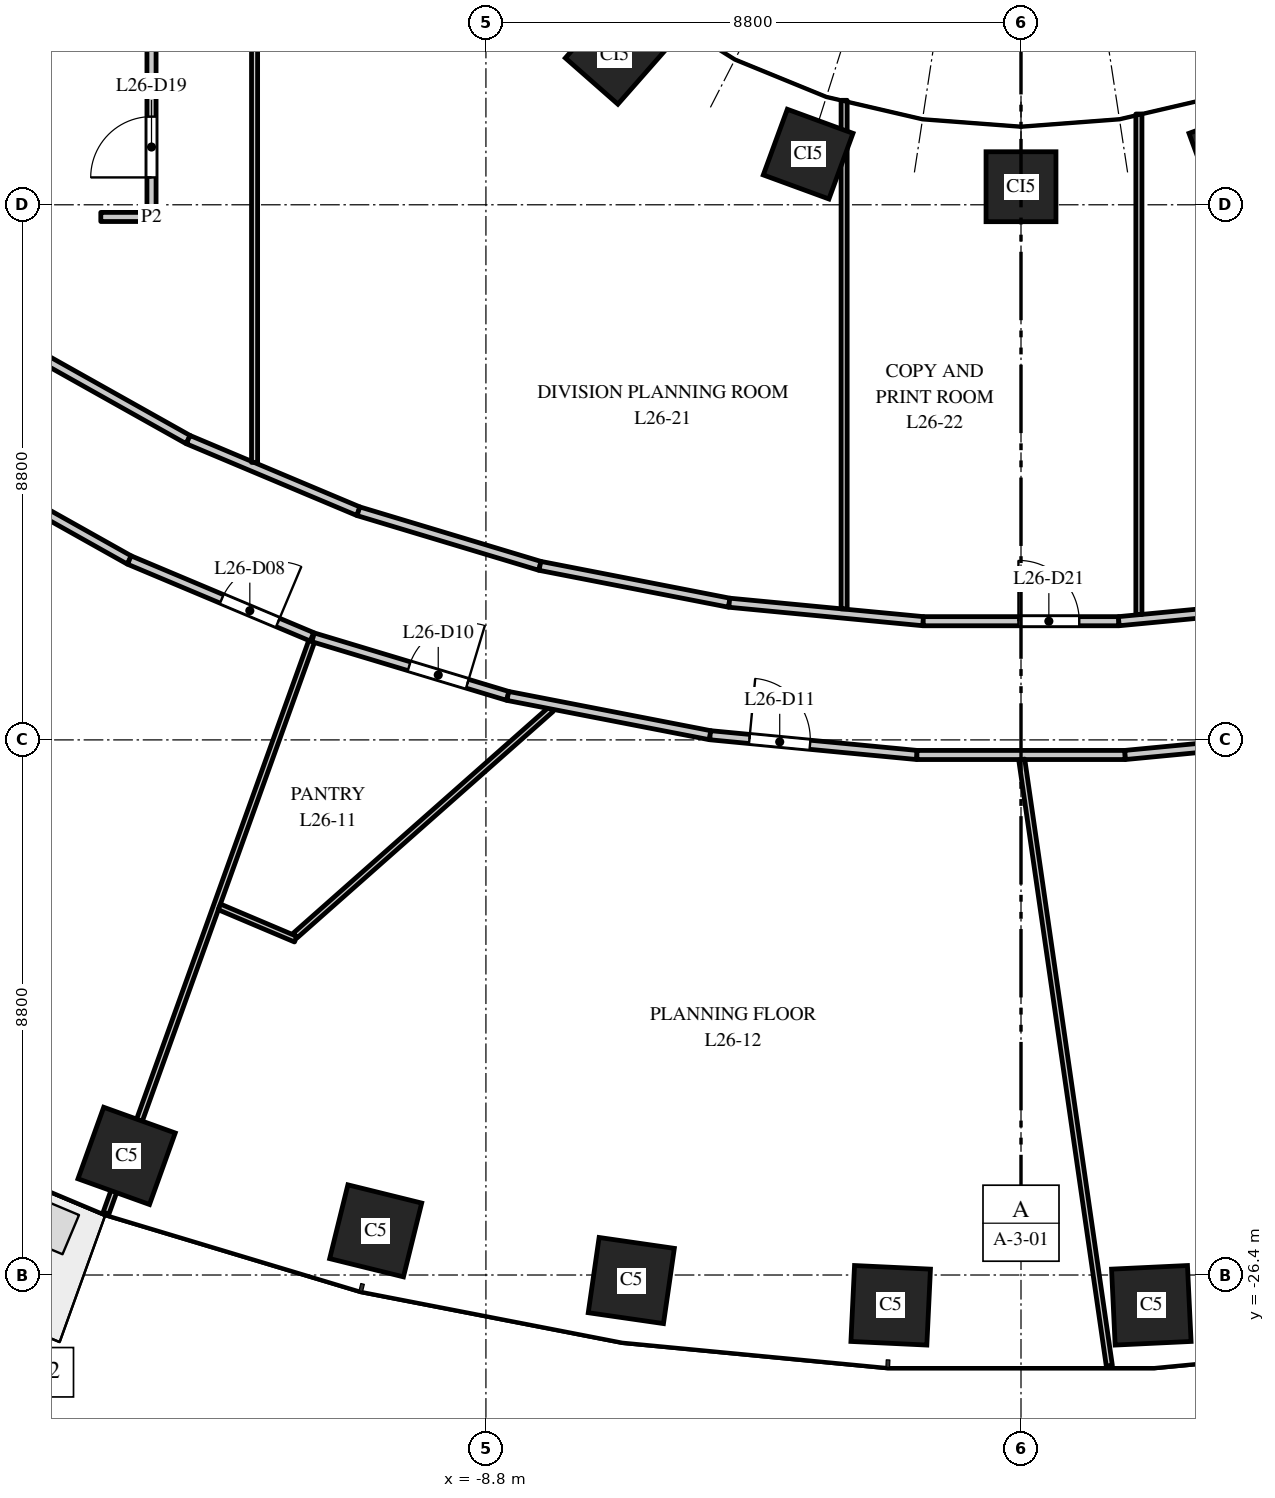
"""IFC4 building model, lengths in metres.
Left out: names, types, materials, properties, quantities, classifications, styles, units other than length and angle.
Written with IfcOpenShell. Run it as: python <this file> out.ifc"""

import sys

from ifc_helpers import new_model, si_unit, direction, frame, frame_2d, origin, origin_2d, place, context, subcontext, project, spatial, rectangle, extrude, element, fill, save


model = new_model("IFC4")
c1 = context("Model", 3, precision=1e-05, world=origin(), true_north=direction((0.0, 1.0)))
c2 = subcontext(c1, "Body", "Model", "MODEL_VIEW")
j1 = project(units=[si_unit("LENGTHUNIT", "METRE"), si_unit("PLANEANGLEUNIT", "RADIAN")], contexts=[c1])
p1 = place(None, origin())
s1 = spatial("IfcSite", under=j1, at=p1, CompositionType="ELEMENT")
p2 = place(p1, origin())
s2 = spatial("IfcBuilding", under=s1, at=p2, CompositionType="ELEMENT")
p3 = place(p2, frame((0.0, 0.0, 116.0)))
s3 = spatial("IfcBuildingStorey", under=s2, at=p3, CompositionType="ELEMENT", Elevation=116.0)
for number, where, z_axis, x_axis in (
    (1, (-14.709, -24.441, 0.0), (0.0, 0.0, 1.0), (0.941, -0.338, 0.0)),
    (2, (-10.613, -25.674, 0.0), (0.0, 0.0, 1.0), (0.971, -0.24, 0.0)),
    (3, (-6.409, -26.491, 0.0), (0.0, 0.0, 1.0), (0.99, -0.143, 0.0)),
    (4, (-2.143, -26.898, 0.0), (0.0, 0.0, 1.0), (0.999, -0.048, 0.0)),
    (5, (2.143, -26.898, 0.0), (0.0, 0.0, 1.0), (0.999, 0.048, 0.0)),
):
    element("IfcColumn", number, at=place(p3, frame(where, z_axis=z_axis, x_axis=x_axis)), inside=s3, PredefinedType="COLUMN", context=c2, shape_type="SweptSolid", body=[
        extrude(rectangle(XDim=1.25, YDim=1.25, at=origin_2d()), origin(), (0.0, 0.0, 1.0), 4.0),
    ])
for number, where, z_axis, x_axis in (
    (6, (-6.682, -6.334, 0.0), (0.0, 0.0, 1.0), (0.751, -0.66, 0.0)),
    (7, (-3.501, -7.967, 0.0), (0.0, 0.0, 1.0), (0.939, -0.344, 0.0)),
    (8, (0.0, -8.503, 0.0), (0.0, 0.0, 1.0), (1.0, 0.0, 0.0)),
    (9, (3.501, -7.967, 0.0), (0.0, 0.0, 1.0), (0.939, 0.344, 0.0)),
):
    element("IfcColumn", number, at=place(p3, frame(where, z_axis=z_axis, x_axis=x_axis)), inside=s3, PredefinedType="COLUMN", context=c2, shape_type="SweptSolid", body=[
        extrude(rectangle(XDim=1.15, YDim=1.15, at=origin_2d()), origin(), (0.0, 0.0, 1.0), 4.0),
    ])
p4 = place(p3, frame((-17.445, -13.082, 0.0), z_axis=(0.0, 0.0, 1.0), x_axis=(0.872072095629, -0.489377420837, 0.0)))
e10 = element("IfcWall", 10, at=p4, inside=s3, PredefinedType="PARTITIONING", context=c2, shape_type="SweptSolid", body=[
    extrude(rectangle(XDim=3.188, YDim=0.15, at=frame_2d((1.594, 0.0))), origin(), (0.0, 0.0, 1.0), 3.7),
])
p5 = place(p3, frame((-16.25, -11.23, 0.0), z_axis=(0.0, 0.0, 1.0), x_axis=(0.872147381065, -0.489243237767, 0.0)))
e11 = element("IfcWall", 11, at=p5, inside=s3, PredefinedType="PARTITIONING", context=c2, shape_type="SweptSolid", body=[
    extrude(rectangle(XDim=2.927, YDim=0.15, at=frame_2d((1.464, 0.0))), origin(), (0.0, 0.0, 1.0), 2.75),
])
p6 = place(p3, frame((-15.134, -9.0, 0.0), z_axis=(0.0, 0.0, 1.0), x_axis=(1.0, 0.0, 0.0)))
e12 = element("IfcWall", 12, at=p6, inside=s3, PredefinedType="PARTITIONING", context=c2, shape_type="SweptSolid", body=[
    extrude(rectangle(XDim=0.834, YDim=0.15, at=frame_2d((0.417, 0.0))), origin(), (0.0, 0.0, 1.0), 3.7),
])
p7 = place(p3, frame((-15.048, -25.383, 0.0), z_axis=(0.0, 0.0, 1.0), x_axis=(0.338391154788, 0.941005540027, 0.0)))
e13 = element("IfcWall", 13, at=p7, inside=s3, PredefinedType="PARTITIONING", context=c2, shape_type="SweptSolid", body=[
    extrude(rectangle(XDim=10.06, YDim=0.1, at=frame_2d((5.03, 0.0))), origin(), (0.0, 0.0, 1.0), 2.9),
])
p8 = place(p3, frame((-14.665, -14.642, 0.0), z_axis=(0.0, 0.0, 1.0), x_axis=(0.921850993012, -0.387544509293, 0.0)))
e14 = element("IfcWall", 14, at=p8, inside=s3, PredefinedType="PARTITIONING", context=c2, shape_type="SweptSolid", body=[
    extrude(rectangle(XDim=3.259, YDim=0.15, at=frame_2d((1.629, 0.0))), origin(), (0.0, 0.0, 1.0), 2.85),
])
p9 = place(p8, frame((1.65, 0.0, 0.0)))
e15 = element("IfcOpeningElement", 15, at=p9, cuts=e14, PredefinedType="OPENING", context=c2, shape_type="SweptSolid", body=[
    extrude(rectangle(XDim=1.0, YDim=2.1, at=frame_2d((0.5, 1.05))), frame((0.0, 0.085, 0.0), z_axis=(0.0, -1.0, 0.0), x_axis=(1.0, 0.0, 0.0)), (0.0, 0.0, 1.0), 0.17),
])
p10 = place(p3, frame((-14.3, -9.0, 0.0), z_axis=(0.0, 0.0, 1.0), x_axis=(0.0, 1.0, 0.0)))
e16 = element("IfcWall", 16, at=p10, inside=s3, PredefinedType="PARTITIONING", context=c2, shape_type="SweptSolid", body=[
    extrude(rectangle(XDim=18.0, YDim=0.15, at=frame_2d((9.0, 0.0))), origin(), (0.0, 0.0, 1.0), 3.7),
])
p11 = place(p10, frame((0.65, 0.0, 0.0)))
e17 = element("IfcOpeningElement", 17, at=p11, cuts=e16, PredefinedType="OPENING", context=c2, shape_type="SweptSolid", body=[
    extrude(rectangle(XDim=1.0, YDim=2.1, at=frame_2d((0.5, 1.05))), frame((0.0, 0.085, 0.0), z_axis=(0.0, -1.0, 0.0), x_axis=(1.0, 0.0, 0.0)), (0.0, 0.0, 1.0), 0.17),
])
p12 = place(p3, frame((-13.697, -12.662, 0.0), z_axis=(0.0, 0.0, 1.0), x_axis=(0.921751821358, -0.387780324183, 0.0)))
e18 = element("IfcWall", 18, at=p12, inside=s3, PredefinedType="PARTITIONING", context=c2, shape_type="SweptSolid", body=[
    extrude(rectangle(XDim=3.038, YDim=0.15, at=frame_2d((1.519, 0.0))), origin(), (0.0, 0.0, 1.0), 2.85),
])
p13 = place(p3, frame((-13.184, -20.346, 0.0), z_axis=(0.0, 0.0, 1.0), x_axis=(0.920969723526, -0.389634146794, 0.0)))
e19 = element("IfcWall", 19, at=p13, inside=s3, PredefinedType="PARTITIONING", context=c2, shape_type="SweptSolid", body=[
    extrude(rectangle(XDim=1.363, YDim=0.1, at=frame_2d((0.681, 0.0))), origin(), (0.0, 0.0, 1.0), 3.7),
])
p14 = place(p3, frame((-12.605, -13.036, 0.0), z_axis=(0.0, 0.0, 1.0), x_axis=(0.0, 1.0, 0.0)))
e20 = element("IfcWall", 20, at=p14, inside=s3, PredefinedType="PARTITIONING", context=c2, shape_type="SweptSolid", body=[
    extrude(rectangle(XDim=26.072, YDim=0.1, at=frame_2d((13.036, 0.0))), origin(), (0.0, 0.0, 1.0), 2.75),
])
p15 = place(p3, frame((-11.938, -20.818, 0.0), z_axis=(0.0, 0.0, 1.0), x_axis=(0.749089420646, 0.662468897289, 0.0)))
e21 = element("IfcWall", 21, at=p15, inside=s3, PredefinedType="PARTITIONING", context=c2, shape_type="SweptSolid", body=[
    extrude(rectangle(XDim=5.62, YDim=0.1, at=frame_2d((2.81, 0.0))), origin(), (0.0, 0.0, 1.0), 3.7),
])
p16 = place(p3, frame((-11.643, -15.913, 0.0), z_axis=(0.0, 0.0, 1.0), x_axis=(0.957584891346, -0.288151307243, 0.0)))
e22 = element("IfcWall", 22, at=p16, inside=s3, PredefinedType="PARTITIONING", context=c2, shape_type="SweptSolid", body=[
    extrude(rectangle(XDim=3.345, YDim=0.15, at=frame_2d((1.672, 0.0))), origin(), (0.0, 0.0, 1.0), 3.7),
])
p17 = place(p16, frame((1.65, 0.0, 0.0)))
e23 = element("IfcOpeningElement", 23, at=p17, cuts=e22, PredefinedType="OPENING", context=c2, shape_type="SweptSolid", body=[
    extrude(rectangle(XDim=1.0, YDim=2.1, at=frame_2d((0.5, 1.05))), frame((0.0, 0.085, 0.0), z_axis=(0.0, -1.0, 0.0), x_axis=(1.0, 0.0, 0.0)), (0.0, 0.0, 1.0), 0.17),
])
p18 = place(p3, frame((-10.897, -13.84, 0.0), z_axis=(0.0, 0.0, 1.0), x_axis=(0.957606118849, -0.28808075455, 0.0)))
e24 = element("IfcWall", 24, at=p18, inside=s3, PredefinedType="PARTITIONING", context=c2, shape_type="SweptSolid", body=[
    extrude(rectangle(XDim=3.117, YDim=0.15, at=frame_2d((1.559, 0.0))), origin(), (0.0, 0.0, 1.0), 3.7),
])
p19 = place(p3, frame((-8.44, -16.877, 0.0), z_axis=(0.0, 0.0, 1.0), x_axis=(0.981665220565, -0.190613207134, 0.0)))
e25 = element("IfcWall", 25, at=p19, inside=s3, PredefinedType="PARTITIONING", context=c2, shape_type="SweptSolid", body=[
    extrude(rectangle(XDim=3.389, YDim=0.15, at=frame_2d((1.695, 0.0))), origin(), (0.0, 0.0, 1.0), 2.85),
])
p20 = place(p3, frame((-7.912, -14.738, 0.0), z_axis=(0.0, 0.0, 1.0), x_axis=(0.981588545092, -0.191007665145, 0.0)))
e26 = element("IfcWall", 26, at=p20, inside=s3, PredefinedType="PARTITIONING", context=c2, shape_type="SweptSolid", body=[
    extrude(rectangle(XDim=3.172, YDim=0.15, at=frame_2d((1.586, 0.0))), origin(), (0.0, 0.0, 1.0), 2.85),
])
p21 = place(p3, frame((-5.113, -17.523, 0.0), z_axis=(0.0, 0.0, 1.0), x_axis=(0.995466844572, -0.095109207532, 0.0)))
e27 = element("IfcWall", 27, at=p21, inside=s3, PredefinedType="PARTITIONING", context=c2, shape_type="SweptSolid", body=[
    extrude(rectangle(XDim=3.417, YDim=0.15, at=frame_2d((1.708, 0.0))), origin(), (0.0, 0.0, 1.0), 3.7),
])
p22 = place(p21, frame((0.65, 0.0, 0.0)))
e28 = element("IfcOpeningElement", 28, at=p22, cuts=e27, PredefinedType="OPENING", context=c2, shape_type="SweptSolid", body=[
    extrude(rectangle(XDim=1.0, YDim=2.1, at=frame_2d((0.5, 1.05))), frame((0.0, 0.085, 0.0), z_axis=(0.0, -1.0, 0.0), x_axis=(1.0, 0.0, 0.0)), (0.0, 0.0, 1.0), 0.17),
])
p23 = place(p3, frame((-4.798, -15.344, 0.0), z_axis=(0.0, 0.0, 1.0), x_axis=(0.995491705426, -0.09484863957, 0.0)))
e29 = element("IfcWall", 29, at=p23, inside=s3, PredefinedType="PARTITIONING", context=c2, shape_type="SweptSolid", body=[
    extrude(rectangle(XDim=3.205, YDim=0.15, at=frame_2d((1.602, 0.0))), origin(), (0.0, 0.0, 1.0), 3.7),
])
p24 = place(p3, frame((-2.909, -15.445, 0.0), z_axis=(0.0, 0.0, 1.0), x_axis=(0.0, 1.0, 0.0)))
e30 = element("IfcWall", 30, at=p24, inside=s3, PredefinedType="PARTITIONING", context=c2, shape_type="SweptSolid", body=[
    extrude(rectangle(XDim=8.363, YDim=0.1, at=frame_2d((4.182, 0.0))), origin(), (0.0, 0.0, 1.0), 2.9),
])
p25 = place(p3, frame((-1.712, -17.848, 0.0), z_axis=(0.0, 0.0, 1.0), x_axis=(1.0, 0.0, 0.0)))
e31 = element("IfcWall", 31, at=p25, inside=s3, PredefinedType="PARTITIONING", context=c2, shape_type="SweptSolid", body=[
    extrude(rectangle(XDim=3.424, YDim=0.15, at=frame_2d((1.712, 0.0))), origin(), (0.0, 0.0, 1.0), 2.85),
])
p26 = place(p3, frame((-1.608, -15.648, 0.0), z_axis=(0.0, 0.0, 1.0), x_axis=(1.0, 0.0, 0.0)))
e32 = element("IfcWall", 32, at=p26, inside=s3, PredefinedType="PARTITIONING", context=c2, shape_type="SweptSolid", body=[
    extrude(rectangle(XDim=3.216, YDim=0.15, at=frame_2d((1.608, 0.0))), origin(), (0.0, 0.0, 1.0), 2.85),
])
p27 = place(p26, frame((1.566, 0.0, 0.0)))
e33 = element("IfcOpeningElement", 33, at=p27, cuts=e32, PredefinedType="OPENING", context=c2, shape_type="SweptSolid", body=[
    extrude(rectangle(XDim=1.0, YDim=2.1, at=frame_2d((0.5, 1.05))), frame((0.0, 0.085, 0.0), z_axis=(0.0, -1.0, 0.0), x_axis=(1.0, 0.0, 0.0)), (0.0, 0.0, 1.0), 0.17),
])
p28 = place(p3, frame((0.012, -17.923, 0.0), z_axis=(0.0, 0.0, 1.0), x_axis=(0.14302591048, -0.989718944414, 0.0)))
e34 = element("IfcWall", 34, at=p28, inside=s3, PredefinedType="PARTITIONING", context=c2, shape_type="SweptSolid", body=[
    extrude(rectangle(XDim=10.074, YDim=0.1, at=frame_2d((5.037, 0.0))), origin(), (0.0, 0.0, 1.0), 2.9),
])
p29 = place(p3, frame((1.608, -15.648, 0.0), z_axis=(0.0, 0.0, 1.0), x_axis=(0.995491705426, 0.09484863957, 0.0)))
e35 = element("IfcWall", 35, at=p29, inside=s3, PredefinedType="PARTITIONING", context=c2, shape_type="SweptSolid", body=[
    extrude(rectangle(XDim=3.205, YDim=0.15, at=frame_2d((1.602, 0.0))), origin(), (0.0, 0.0, 1.0), 2.85),
])
p30 = place(p3, frame((1.712, -17.848, 0.0), z_axis=(0.0, 0.0, 1.0), x_axis=(0.995466844572, 0.095109207532, 0.0)))
e36 = element("IfcWall", 36, at=p30, inside=s3, PredefinedType="PARTITIONING", context=c2, shape_type="SweptSolid", body=[
    extrude(rectangle(XDim=3.417, YDim=0.15, at=frame_2d((1.708, 0.0))), origin(), (0.0, 0.0, 1.0), 2.85),
])
p31 = place(p30, frame((1.9, 0.0, 0.0)))
e37 = element("IfcOpeningElement", 37, at=p31, cuts=e36, PredefinedType="OPENING", context=c2, shape_type="SweptSolid", body=[
    extrude(rectangle(XDim=1.0, YDim=2.1, at=frame_2d((0.5, 1.05))), frame((0.0, 0.085, 0.0), z_axis=(0.0, -1.0, 0.0), x_axis=(1.0, 0.0, 0.0)), (0.0, 0.0, 1.0), 0.17),
])
p32 = place(p3, frame((1.939, -15.537, 0.0), z_axis=(0.0, 0.0, 1.0), x_axis=(0.0, 1.0, 0.0)))
e38 = element("IfcWall", 38, at=p32, inside=s3, PredefinedType="PARTITIONING", context=c2, shape_type="SweptSolid", body=[
    extrude(rectangle(XDim=8.23, YDim=0.1, at=frame_2d((4.115, 0.0))), origin(), (0.0, 0.0, 1.0), 2.85),
])
p33 = place(p9, origin())
e39 = element("IfcDoor", 39, at=p33, inside=s3, OperationType="SINGLE_SWING_RIGHT", PredefinedType="DOOR", context=c2, shape_type="SweptSolid", body=[
    extrude(rectangle(XDim=1.0, YDim=2.1, at=frame_2d((0.5, 1.05))), frame((0.0, 0.025, 0.0), z_axis=(0.0, -1.0, 0.0), x_axis=(1.0, 0.0, 0.0)), (0.0, 0.0, 1.0), 0.05),
])
fill(e15, e39)
p34 = place(p17, origin())
e40 = element("IfcDoor", 40, at=p34, inside=s3, OperationType="SINGLE_SWING_RIGHT", PredefinedType="DOOR", context=c2, shape_type="SweptSolid", body=[
    extrude(rectangle(XDim=1.0, YDim=2.1, at=frame_2d((0.5, 1.05))), frame((0.0, 0.025, 0.0), z_axis=(0.0, -1.0, 0.0), x_axis=(1.0, 0.0, 0.0)), (0.0, 0.0, 1.0), 0.05),
])
fill(e23, e40)
p35 = place(p22, origin())
e41 = element("IfcDoor", 41, at=p35, inside=s3, OperationType="SINGLE_SWING_LEFT", PredefinedType="DOOR", context=c2, shape_type="SweptSolid", body=[
    extrude(rectangle(XDim=1.0, YDim=2.1, at=frame_2d((0.5, 1.05))), frame((0.0, 0.025, 0.0), z_axis=(0.0, -1.0, 0.0), x_axis=(1.0, 0.0, 0.0)), (0.0, 0.0, 1.0), 0.05),
])
fill(e28, e41)
p36 = place(p11, origin())
e42 = element("IfcDoor", 42, at=p36, inside=s3, OperationType="SINGLE_SWING_LEFT", PredefinedType="DOOR", context=c2, shape_type="SweptSolid", body=[
    extrude(rectangle(XDim=1.0, YDim=2.1, at=frame_2d((0.5, 1.05))), frame((0.0, 0.025, 0.0), z_axis=(0.0, -1.0, 0.0), x_axis=(1.0, 0.0, 0.0)), (0.0, 0.0, 1.0), 0.05),
])
fill(e17, e42)
p37 = place(p27, origin())
e43 = element("IfcDoor", 43, at=p37, inside=s3, OperationType="SINGLE_SWING_LEFT", PredefinedType="DOOR", context=c2, shape_type="SweptSolid", body=[
    extrude(rectangle(XDim=1.0, YDim=2.1, at=frame_2d((0.5, 1.05))), frame((0.0, 0.025, 0.0), z_axis=(0.0, -1.0, 0.0), x_axis=(1.0, 0.0, 0.0)), (0.0, 0.0, 1.0), 0.05),
])
fill(e33, e43)
save(model, sys.argv[1])
